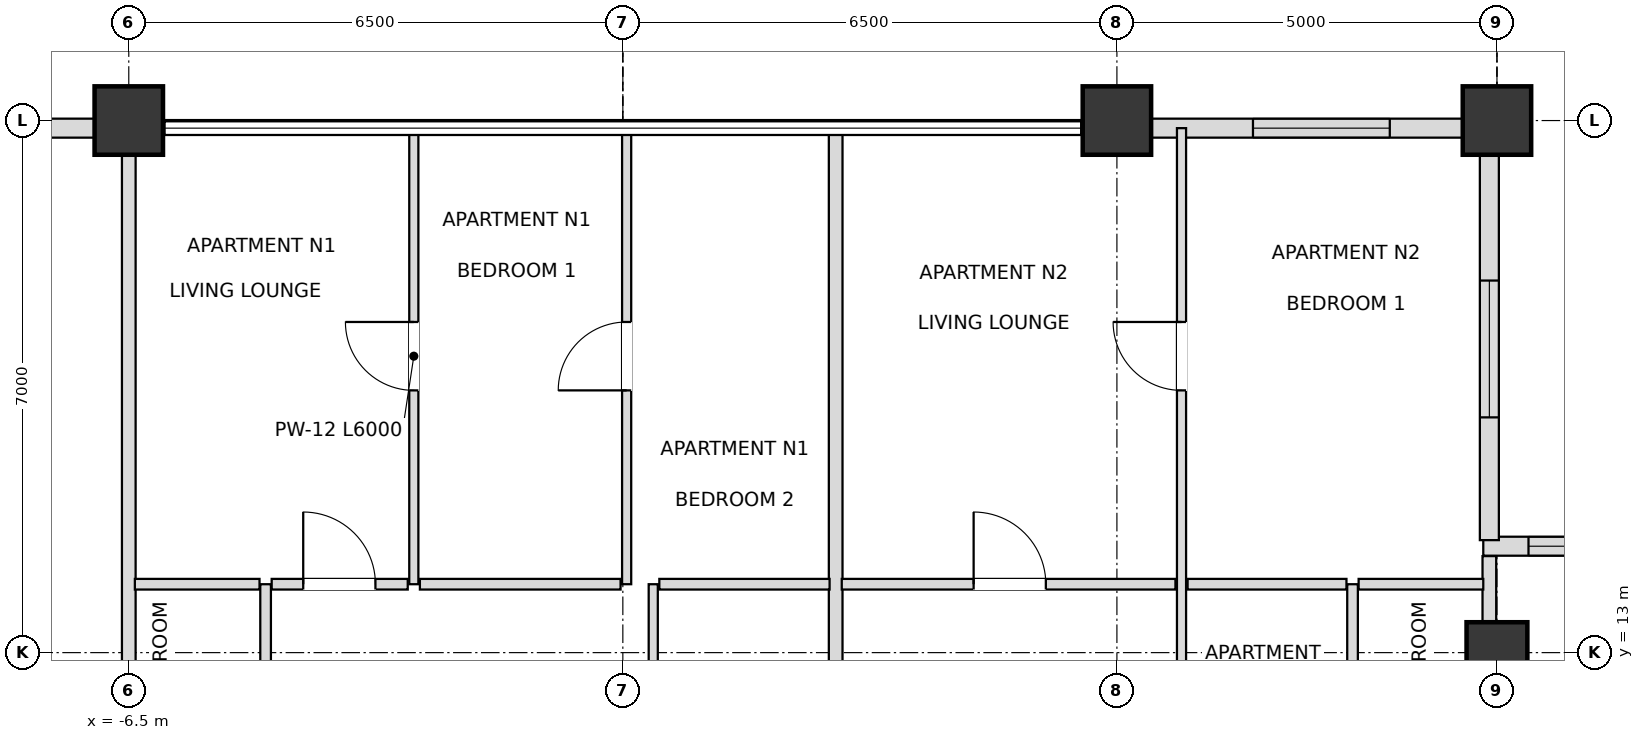
"""IFC4 building model, lengths in metres.
Left out: names, types, materials, properties, quantities, classifications, styles, units other than length and angle.
Written with IfcOpenShell. Run it as: python <this file> out.ifc"""

import sys

from ifc_helpers import new_model, si_unit, direction, frame, frame_2d, origin, origin_2d, place, context, subcontext, project, spatial, rectangle, extrude, element, fill, save


model = new_model("IFC4")
c1 = context("Model", 3, precision=1e-05, world=origin(), true_north=direction((0.0, 1.0)))
c2 = subcontext(c1, "Body", "Model", "MODEL_VIEW")
j1 = project(units=[si_unit("LENGTHUNIT", "METRE"), si_unit("PLANEANGLEUNIT", "RADIAN")], contexts=[c1])
p1 = place(None, origin())
s1 = spatial("IfcSite", under=j1, at=p1, CompositionType="ELEMENT")
p2 = place(p1, origin())
s2 = spatial("IfcBuilding", under=s1, at=p2, CompositionType="ELEMENT")
p3 = place(p2, frame((0.0, 0.0, 240.3)))
s3 = spatial("IfcBuildingStorey", under=s2, at=p3, CompositionType="ELEMENT", Elevation=240.3)
for number, where, z_axis, x_axis in (
    (1, (11.5, 20.0, 0.0), (0.0, 0.0, 1.0), (1.0, 0.0, 0.0)),
    (2, (6.5, 20.0, 0.0), (0.0, 0.0, 1.0), (1.0, 0.0, 0.0)),
    (3, (-6.5, 20.0, 0.0), (0.0, 0.0, 1.0), (1.0, 0.0, 0.0)),
):
    element("IfcColumn", number, at=place(p3, frame(where, z_axis=z_axis, x_axis=x_axis)), inside=s3, PredefinedType="USERDEFINED", context=c2, shape_type="SweptSolid", body=[
        extrude(rectangle(XDim=0.9, YDim=0.9, at=origin_2d()), origin(), (0.0, 0.0, 1.0), 3.6),
    ])
p4 = place(p3, frame((11.5, 13.0, 0.0), z_axis=(0.0, 0.0, 1.0), x_axis=(1.0, 0.0, 0.0)))
e4 = element("IfcColumn", 4, at=p4, inside=s3, PredefinedType="COLUMN", context=c2, shape_type="SweptSolid", body=[
    extrude(rectangle(XDim=0.8, YDim=0.8, at=origin_2d()), origin(), (0.0, 0.0, 1.0), 3.6),
])
p5 = place(p3, frame((11.055, 19.9, 0.0), z_axis=(0.0, 0.0, 1.0), x_axis=(-1.0, 0.0, 0.0)))
e5 = element("IfcWall", 5, at=p5, inside=s3, PredefinedType="SOLIDWALL", context=c2, shape_type="SweptSolid", body=[
    extrude(rectangle(XDim=4.11, YDim=0.25, at=frame_2d((2.055, 0.0))), origin(), (0.0, 0.0, 1.0), 2.748),
])
p6 = place(p5, frame((0.965, 0.0, 0.72)))
e6 = element("IfcOpeningElement", 6, at=p6, cuts=e5, PredefinedType="OPENING", context=c2, shape_type="SweptSolid", body=[
    extrude(rectangle(XDim=1.8, YDim=1.68, at=frame_2d((0.9, 0.84))), frame((0.0, 0.135, 0.0), z_axis=(0.0, -1.0, 0.0), x_axis=(1.0, 0.0, 0.0)), (0.0, 0.0, 1.0), 0.27),
])
p7 = place(p3, frame((-6.945, 19.9, 0.0), z_axis=(0.0, 0.0, 1.0), x_axis=(-1.0, 0.0, 0.0)))
e7 = element("IfcWall", 7, at=p7, inside=s3, PredefinedType="SOLIDWALL", context=c2, shape_type="SweptSolid", body=[
    extrude(rectangle(XDim=4.11, YDim=0.25, at=frame_2d((2.055, 0.0))), origin(), (0.0, 0.0, 1.0), 2.748),
])
p8 = place(p7, frame((1.155, 0.0, 0.72)))
e8 = element("IfcOpeningElement", 8, at=p8, cuts=e7, PredefinedType="OPENING", context=c2, shape_type="SweptSolid", body=[
    extrude(rectangle(XDim=1.8, YDim=1.68, at=frame_2d((0.9, 0.84))), frame((0.0, 0.135, 0.0), z_axis=(0.0, -1.0, 0.0), x_axis=(1.0, 0.0, 0.0)), (0.0, 0.0, 1.0), 0.27),
])
p9 = place(p3, frame((16.98, 14.4, 0.0), z_axis=(0.0, 0.0, 1.0), x_axis=(-1.0, 0.0, 0.0)))
e9 = element("IfcWall", 9, at=p9, inside=s3, PredefinedType="SOLIDWALL", context=c2, shape_type="SweptSolid", body=[
    extrude(rectangle(XDim=5.66, YDim=0.25, at=frame_2d((2.83, 0.0))), origin(), (0.0, 0.0, 1.0), 2.748),
])
p10 = place(p9, frame((0.595, 0.0, 0.72)))
e10 = element("IfcOpeningElement", 10, at=p10, cuts=e9, PredefinedType="OPENING", context=c2, shape_type="SweptSolid", body=[
    extrude(rectangle(XDim=1.8, YDim=1.68, at=frame_2d((0.9, 0.84))), frame((0.0, 0.135, 0.0), z_axis=(0.0, -1.0, 0.0), x_axis=(1.0, 0.0, 0.0)), (0.0, 0.0, 1.0), 0.27),
])
p11 = place(p9, frame((3.265, 0.0, 0.72)))
e11 = element("IfcOpeningElement", 11, at=p11, cuts=e9, PredefinedType="OPENING", context=c2, shape_type="SweptSolid", body=[
    extrude(rectangle(XDim=1.8, YDim=1.68, at=frame_2d((0.9, 0.84))), frame((0.0, 0.135, 0.0), z_axis=(0.0, -1.0, 0.0), x_axis=(1.0, 0.0, 0.0)), (0.0, 0.0, 1.0), 0.27),
])
p12 = place(p3, frame((11.4, 14.48, 0.0), z_axis=(0.0, 0.0, 1.0), x_axis=(0.0, 1.0, 0.0)))
e12 = element("IfcWall", 12, at=p12, inside=s3, PredefinedType="SOLIDWALL", context=c2, shape_type="SweptSolid", body=[
    extrude(rectangle(XDim=5.34, YDim=0.25, at=frame_2d((2.67, 0.0))), origin(), (0.0, 0.0, 1.0), 2.748),
])
p13 = place(p12, frame((1.615, 0.0, 0.72)))
e13 = element("IfcOpeningElement", 13, at=p13, cuts=e12, PredefinedType="OPENING", context=c2, shape_type="SweptSolid", body=[
    extrude(rectangle(XDim=1.8, YDim=1.68, at=frame_2d((0.9, 0.84))), frame((0.0, 0.135, 0.0), z_axis=(0.0, -1.0, 0.0), x_axis=(1.0, 0.0, 0.0)), (0.0, 0.0, 1.0), 0.27),
])
p14 = place(p3, frame((-6.5, 9.2, 0.0), z_axis=(0.0, 0.0, 1.0), x_axis=(0.0, 1.0, 0.0)))
e14 = element("IfcWall", 14, at=p14, inside=s3, PredefinedType="PARTITIONING", context=c2, shape_type="SweptSolid", body=[
    extrude(rectangle(XDim=10.7, YDim=0.18, at=frame_2d((5.35, 0.0))), origin(), (0.0, 0.0, 1.0), 2.826),
])
p15 = place(p3, frame((-4.7, 9.2, 0.0), z_axis=(0.0, 0.0, 1.0), x_axis=(0.0, 1.0, 0.0)))
e15 = element("IfcWall", 15, at=p15, inside=s3, PredefinedType="PARTITIONING", context=c2, shape_type="SweptSolid", body=[
    extrude(rectangle(XDim=4.7, YDim=0.14, at=frame_2d((2.35, 0.0))), origin(), (0.0, 0.0, 1.0), 3.38),
])
p16 = place(p15, frame((1.9, 0.0, 0.0)))
e16 = element("IfcOpeningElement", 16, at=p16, cuts=e15, PredefinedType="OPENING", context=c2, shape_type="SweptSolid", body=[
    extrude(rectangle(XDim=0.9, YDim=2.1, at=frame_2d((0.45, 1.05))), frame((0.0, 0.08, 0.0), z_axis=(0.0, -1.0, 0.0), x_axis=(1.0, 0.0, 0.0)), (0.0, 0.0, 1.0), 0.16),
])
p17 = place(p3, frame((-2.75, 13.9, 0.0), z_axis=(0.0, 0.0, 1.0), x_axis=(0.0, 1.0, 0.0)))
e17 = element("IfcWall", 17, at=p17, inside=s3, PredefinedType="PARTITIONING", context=c2, shape_type="SweptSolid", body=[
    extrude(rectangle(XDim=6.0, YDim=0.12, at=frame_2d((3.0, 0.0))), origin(), (0.0, 0.0, 1.0), 3.018),
])
p18 = place(p17, frame((2.55, 0.0, 0.0)))
e18 = element("IfcOpeningElement", 18, at=p18, cuts=e17, PredefinedType="OPENING", context=c2, shape_type="SweptSolid", body=[
    extrude(rectangle(XDim=0.9, YDim=2.1, at=frame_2d((0.45, 1.05))), frame((0.0, 0.07, 0.0), z_axis=(0.0, -1.0, 0.0), x_axis=(1.0, 0.0, 0.0)), (0.0, 0.0, 1.0), 0.14),
])
p19 = place(p3, frame((0.05, 13.9, 0.0), z_axis=(0.0, 0.0, 1.0), x_axis=(0.0, 1.0, 0.0)))
e19 = element("IfcWall", 19, at=p19, inside=s3, PredefinedType="PARTITIONING", context=c2, shape_type="SweptSolid", body=[
    extrude(rectangle(XDim=6.0, YDim=0.12, at=frame_2d((3.0, 0.0))), origin(), (0.0, 0.0, 1.0), 3.018),
])
p20 = place(p19, frame((2.55, 0.0, 0.0)))
e20 = element("IfcOpeningElement", 20, at=p20, cuts=e19, PredefinedType="OPENING", context=c2, shape_type="SweptSolid", body=[
    extrude(rectangle(XDim=0.9, YDim=2.1, at=frame_2d((0.45, 1.05))), frame((0.0, 0.07, 0.0), z_axis=(0.0, -1.0, 0.0), x_axis=(1.0, 0.0, 0.0)), (0.0, 0.0, 1.0), 0.14),
])
p21 = place(p3, frame((0.4, 9.2, 0.0), z_axis=(0.0, 0.0, 1.0), x_axis=(0.0, 1.0, 0.0)))
e21 = element("IfcWall", 21, at=p21, inside=s3, PredefinedType="PARTITIONING", context=c2, shape_type="SweptSolid", body=[
    extrude(rectangle(XDim=4.7, YDim=0.12, at=frame_2d((2.35, 0.0))), origin(), (0.0, 0.0, 1.0), 3.38),
])
p22 = place(p21, frame((1.875, 0.0, 0.0)))
e22 = element("IfcOpeningElement", 22, at=p22, cuts=e21, PredefinedType="OPENING", context=c2, shape_type="SweptSolid", body=[
    extrude(rectangle(XDim=0.95, YDim=2.1, at=frame_2d((0.475, 1.05))), frame((0.0, 0.07, 0.0), z_axis=(0.0, -1.0, 0.0), x_axis=(1.0, 0.0, 0.0)), (0.0, 0.0, 1.0), 0.14),
])
p23 = place(p3, frame((2.8, 9.2, 0.0), z_axis=(0.0, 0.0, 1.0), x_axis=(0.0, 1.0, 0.0)))
e23 = element("IfcWall", 23, at=p23, inside=s3, PredefinedType="PARTITIONING", context=c2, shape_type="SweptSolid", body=[
    extrude(rectangle(XDim=10.7, YDim=0.18, at=frame_2d((5.35, 0.0))), origin(), (0.0, 0.0, 1.0), 3.018),
])
p24 = place(p3, frame((7.35, 9.2, 0.0), z_axis=(0.0, 0.0, 1.0), x_axis=(0.0, 1.0, 0.0)))
e24 = element("IfcWall", 24, at=p24, inside=s3, PredefinedType="PARTITIONING", context=c2, shape_type="SweptSolid", body=[
    extrude(rectangle(XDim=10.7, YDim=0.12, at=frame_2d((5.35, 0.0))), origin(), (0.0, 0.0, 1.0), 2.826),
])
p25 = place(p24, frame((1.875, 0.0, 0.0)))
e25 = element("IfcOpeningElement", 25, at=p25, cuts=e24, PredefinedType="OPENING", context=c2, shape_type="SweptSolid", body=[
    extrude(rectangle(XDim=0.95, YDim=2.1, at=frame_2d((0.475, 1.05))), frame((0.0, 0.07, 0.0), z_axis=(0.0, -1.0, 0.0), x_axis=(1.0, 0.0, 0.0)), (0.0, 0.0, 1.0), 0.14),
])
p26 = place(p24, frame((7.25, 0.0, 0.0)))
e26 = element("IfcOpeningElement", 26, at=p26, cuts=e24, PredefinedType="OPENING", context=c2, shape_type="SweptSolid", body=[
    extrude(rectangle(XDim=0.9, YDim=2.1, at=frame_2d((0.45, 1.05))), frame((0.0, 0.07, 0.0), z_axis=(0.0, -1.0, 0.0), x_axis=(1.0, 0.0, 0.0)), (0.0, 0.0, 1.0), 0.14),
])
p27 = place(p3, frame((9.6, 9.2, 0.0), z_axis=(0.0, 0.0, 1.0), x_axis=(0.0, 1.0, 0.0)))
e27 = element("IfcWall", 27, at=p27, inside=s3, PredefinedType="PARTITIONING", context=c2, shape_type="SweptSolid", body=[
    extrude(rectangle(XDim=4.7, YDim=0.14, at=frame_2d((2.35, 0.0))), origin(), (0.0, 0.0, 1.0), 2.826),
])
p28 = place(p27, frame((1.9, 0.0, 0.0)))
e28 = element("IfcOpeningElement", 28, at=p28, cuts=e27, PredefinedType="OPENING", context=c2, shape_type="SweptSolid", body=[
    extrude(rectangle(XDim=0.9, YDim=2.1, at=frame_2d((0.45, 1.05))), frame((0.0, 0.08, 0.0), z_axis=(0.0, -1.0, 0.0), x_axis=(1.0, 0.0, 0.0)), (0.0, 0.0, 1.0), 0.16),
])
p29 = place(p3, frame((11.4, 9.2, 0.0), z_axis=(0.0, 0.0, 1.0), x_axis=(0.0, 1.0, 0.0)))
e29 = element("IfcWall", 29, at=p29, inside=s3, PredefinedType="PARTITIONING", context=c2, shape_type="SweptSolid", body=[
    extrude(rectangle(XDim=5.07, YDim=0.18, at=frame_2d((2.535, 0.0))), origin(), (0.0, 0.0, 1.0), 2.748),
])
p30 = place(p3, frame((-6.42, 13.9, 0.0), z_axis=(0.0, 0.0, 1.0), x_axis=(1.0, 0.0, 0.0)))
e30 = element("IfcWall", 30, at=p30, inside=s3, PredefinedType="PARTITIONING", context=c2, shape_type="SweptSolid", body=[
    extrude(rectangle(XDim=1.64, YDim=0.14, at=frame_2d((0.82, 0.0))), origin(), (0.0, 0.0, 1.0), 3.38),
])
p31 = place(p3, frame((-4.62, 13.9, 0.0), z_axis=(0.0, 0.0, 1.0), x_axis=(1.0, 0.0, 0.0)))
e31 = element("IfcWall", 31, at=p31, inside=s3, PredefinedType="PARTITIONING", context=c2, shape_type="SweptSolid", body=[
    extrude(rectangle(XDim=1.79, YDim=0.14, at=frame_2d((0.895, 0.0))), origin(), (0.0, 0.0, 1.0), 3.38),
])
p32 = place(p31, frame((0.415, 0.0, 0.0)))
e32 = element("IfcOpeningElement", 32, at=p32, cuts=e31, PredefinedType="OPENING", context=c2, shape_type="SweptSolid", body=[
    extrude(rectangle(XDim=0.95, YDim=2.1, at=frame_2d((0.475, 1.05))), frame((0.0, 0.08, 0.0), z_axis=(0.0, -1.0, 0.0), x_axis=(1.0, 0.0, 0.0)), (0.0, 0.0, 1.0), 0.16),
])
p33 = place(p3, frame((-2.67, 13.9, 0.0), z_axis=(0.0, 0.0, 1.0), x_axis=(1.0, 0.0, 0.0)))
e33 = element("IfcWall", 33, at=p33, inside=s3, PredefinedType="PARTITIONING", context=c2, shape_type="SweptSolid", body=[
    extrude(rectangle(XDim=2.64, YDim=0.14, at=frame_2d((1.32, 0.0))), origin(), (0.0, 0.0, 1.0), 3.38),
])
p34 = place(p3, frame((0.48, 13.9, 0.0), z_axis=(0.0, 0.0, 1.0), x_axis=(1.0, 0.0, 0.0)))
e34 = element("IfcWall", 34, at=p34, inside=s3, PredefinedType="PARTITIONING", context=c2, shape_type="SweptSolid", body=[
    extrude(rectangle(XDim=2.24, YDim=0.14, at=frame_2d((1.12, 0.0))), origin(), (0.0, 0.0, 1.0), 3.38),
])
p35 = place(p3, frame((2.88, 13.9, 0.0), z_axis=(0.0, 0.0, 1.0), x_axis=(1.0, 0.0, 0.0)))
e35 = element("IfcWall", 35, at=p35, inside=s3, PredefinedType="PARTITIONING", context=c2, shape_type="SweptSolid", body=[
    extrude(rectangle(XDim=4.39, YDim=0.14, at=frame_2d((2.195, 0.0))), origin(), (0.0, 0.0, 1.0), 2.826),
])
p36 = place(p35, frame((1.735, 0.0, 0.0)))
e36 = element("IfcOpeningElement", 36, at=p36, cuts=e35, PredefinedType="OPENING", context=c2, shape_type="SweptSolid", body=[
    extrude(rectangle(XDim=0.95, YDim=2.1, at=frame_2d((0.475, 1.05))), frame((0.0, 0.08, 0.0), z_axis=(0.0, -1.0, 0.0), x_axis=(1.0, 0.0, 0.0)), (0.0, 0.0, 1.0), 0.16),
])
p37 = place(p3, frame((7.43, 13.9, 0.0), z_axis=(0.0, 0.0, 1.0), x_axis=(1.0, 0.0, 0.0)))
e37 = element("IfcWall", 37, at=p37, inside=s3, PredefinedType="PARTITIONING", context=c2, shape_type="SweptSolid", body=[
    extrude(rectangle(XDim=2.09, YDim=0.14, at=frame_2d((1.045, 0.0))), origin(), (0.0, 0.0, 1.0), 3.38),
])
p38 = place(p3, frame((9.68, 13.9, 0.0), z_axis=(0.0, 0.0, 1.0), x_axis=(1.0, 0.0, 0.0)))
e38 = element("IfcWall", 38, at=p38, inside=s3, PredefinedType="PARTITIONING", context=c2, shape_type="SweptSolid", body=[
    extrude(rectangle(XDim=1.64, YDim=0.14, at=frame_2d((0.82, 0.0))), origin(), (0.0, 0.0, 1.0), 3.38),
])
p39 = place(p6, origin())
e39 = element("IfcWindow", 39, at=p39, inside=s3, PartitioningType="SINGLE_PANEL", PredefinedType="WINDOW", context=c2, shape_type="SweptSolid", body=[
    extrude(rectangle(XDim=1.8, YDim=1.68, at=frame_2d((0.9, 0.84))), frame((0.0, 0.03, 0.0), z_axis=(0.0, -1.0, 0.0), x_axis=(1.0, 0.0, 0.0)), (0.0, 0.0, 1.0), 0.06),
])
fill(e6, e39)
p40 = place(p11, origin())
e40 = element("IfcWindow", 40, at=p40, inside=s3, PartitioningType="SINGLE_PANEL", PredefinedType="WINDOW", context=c2, shape_type="SweptSolid", body=[
    extrude(rectangle(XDim=1.8, YDim=1.68, at=frame_2d((0.9, 0.84))), frame((0.0, 0.03, 0.0), z_axis=(0.0, -1.0, 0.0), x_axis=(1.0, 0.0, 0.0)), (0.0, 0.0, 1.0), 0.06),
])
fill(e11, e40)
p41 = place(p13, origin())
e41 = element("IfcWindow", 41, at=p41, inside=s3, PartitioningType="SINGLE_PANEL", PredefinedType="WINDOW", context=c2, shape_type="SweptSolid", body=[
    extrude(rectangle(XDim=1.8, YDim=1.68, at=frame_2d((0.9, 0.84))), frame((0.0, 0.03, 0.0), z_axis=(0.0, -1.0, 0.0), x_axis=(1.0, 0.0, 0.0)), (0.0, 0.0, 1.0), 0.06),
])
fill(e13, e41)
p42 = place(p32, origin())
e42 = element("IfcDoor", 42, at=p42, inside=s3, OperationType="SINGLE_SWING_LEFT", PredefinedType="DOOR", context=c2, shape_type="SweptSolid", body=[
    extrude(rectangle(XDim=0.95, YDim=2.1, at=frame_2d((0.475, 1.05))), frame((0.0, 0.025, 0.0), z_axis=(0.0, -1.0, 0.0), x_axis=(1.0, 0.0, 0.0)), (0.0, 0.0, 1.0), 0.05),
])
fill(e32, e42)
p43 = place(p18, origin())
e43 = element("IfcDoor", 43, at=p43, inside=s3, OperationType="SINGLE_SWING_RIGHT", PredefinedType="DOOR", context=c2, shape_type="SweptSolid", body=[
    extrude(rectangle(XDim=0.9, YDim=2.1, at=frame_2d((0.45, 1.05))), frame((0.0, 0.025, 0.0), z_axis=(0.0, -1.0, 0.0), x_axis=(1.0, 0.0, 0.0)), (0.0, 0.0, 1.0), 0.05),
])
fill(e18, e43)
p44 = place(p20, origin())
e44 = element("IfcDoor", 44, at=p44, inside=s3, OperationType="SINGLE_SWING_LEFT", PredefinedType="DOOR", context=c2, shape_type="SweptSolid", body=[
    extrude(rectangle(XDim=0.9, YDim=2.1, at=frame_2d((0.45, 1.05))), frame((0.0, 0.025, 0.0), z_axis=(0.0, -1.0, 0.0), x_axis=(1.0, 0.0, 0.0)), (0.0, 0.0, 1.0), 0.05),
])
fill(e20, e44)
p45 = place(p36, origin())
e45 = element("IfcDoor", 45, at=p45, inside=s3, OperationType="SINGLE_SWING_LEFT", PredefinedType="DOOR", context=c2, shape_type="SweptSolid", body=[
    extrude(rectangle(XDim=0.95, YDim=2.1, at=frame_2d((0.475, 1.05))), frame((0.0, 0.025, 0.0), z_axis=(0.0, -1.0, 0.0), x_axis=(1.0, 0.0, 0.0)), (0.0, 0.0, 1.0), 0.05),
])
fill(e36, e45)
p46 = place(p26, origin())
e46 = element("IfcDoor", 46, at=p46, inside=s3, OperationType="SINGLE_SWING_RIGHT", PredefinedType="DOOR", context=c2, shape_type="SweptSolid", body=[
    extrude(rectangle(XDim=0.9, YDim=2.1, at=frame_2d((0.45, 1.05))), frame((0.0, 0.025, 0.0), z_axis=(0.0, -1.0, 0.0), x_axis=(1.0, 0.0, 0.0)), (0.0, 0.0, 1.0), 0.05),
])
fill(e26, e46)
save(model, sys.argv[1])
